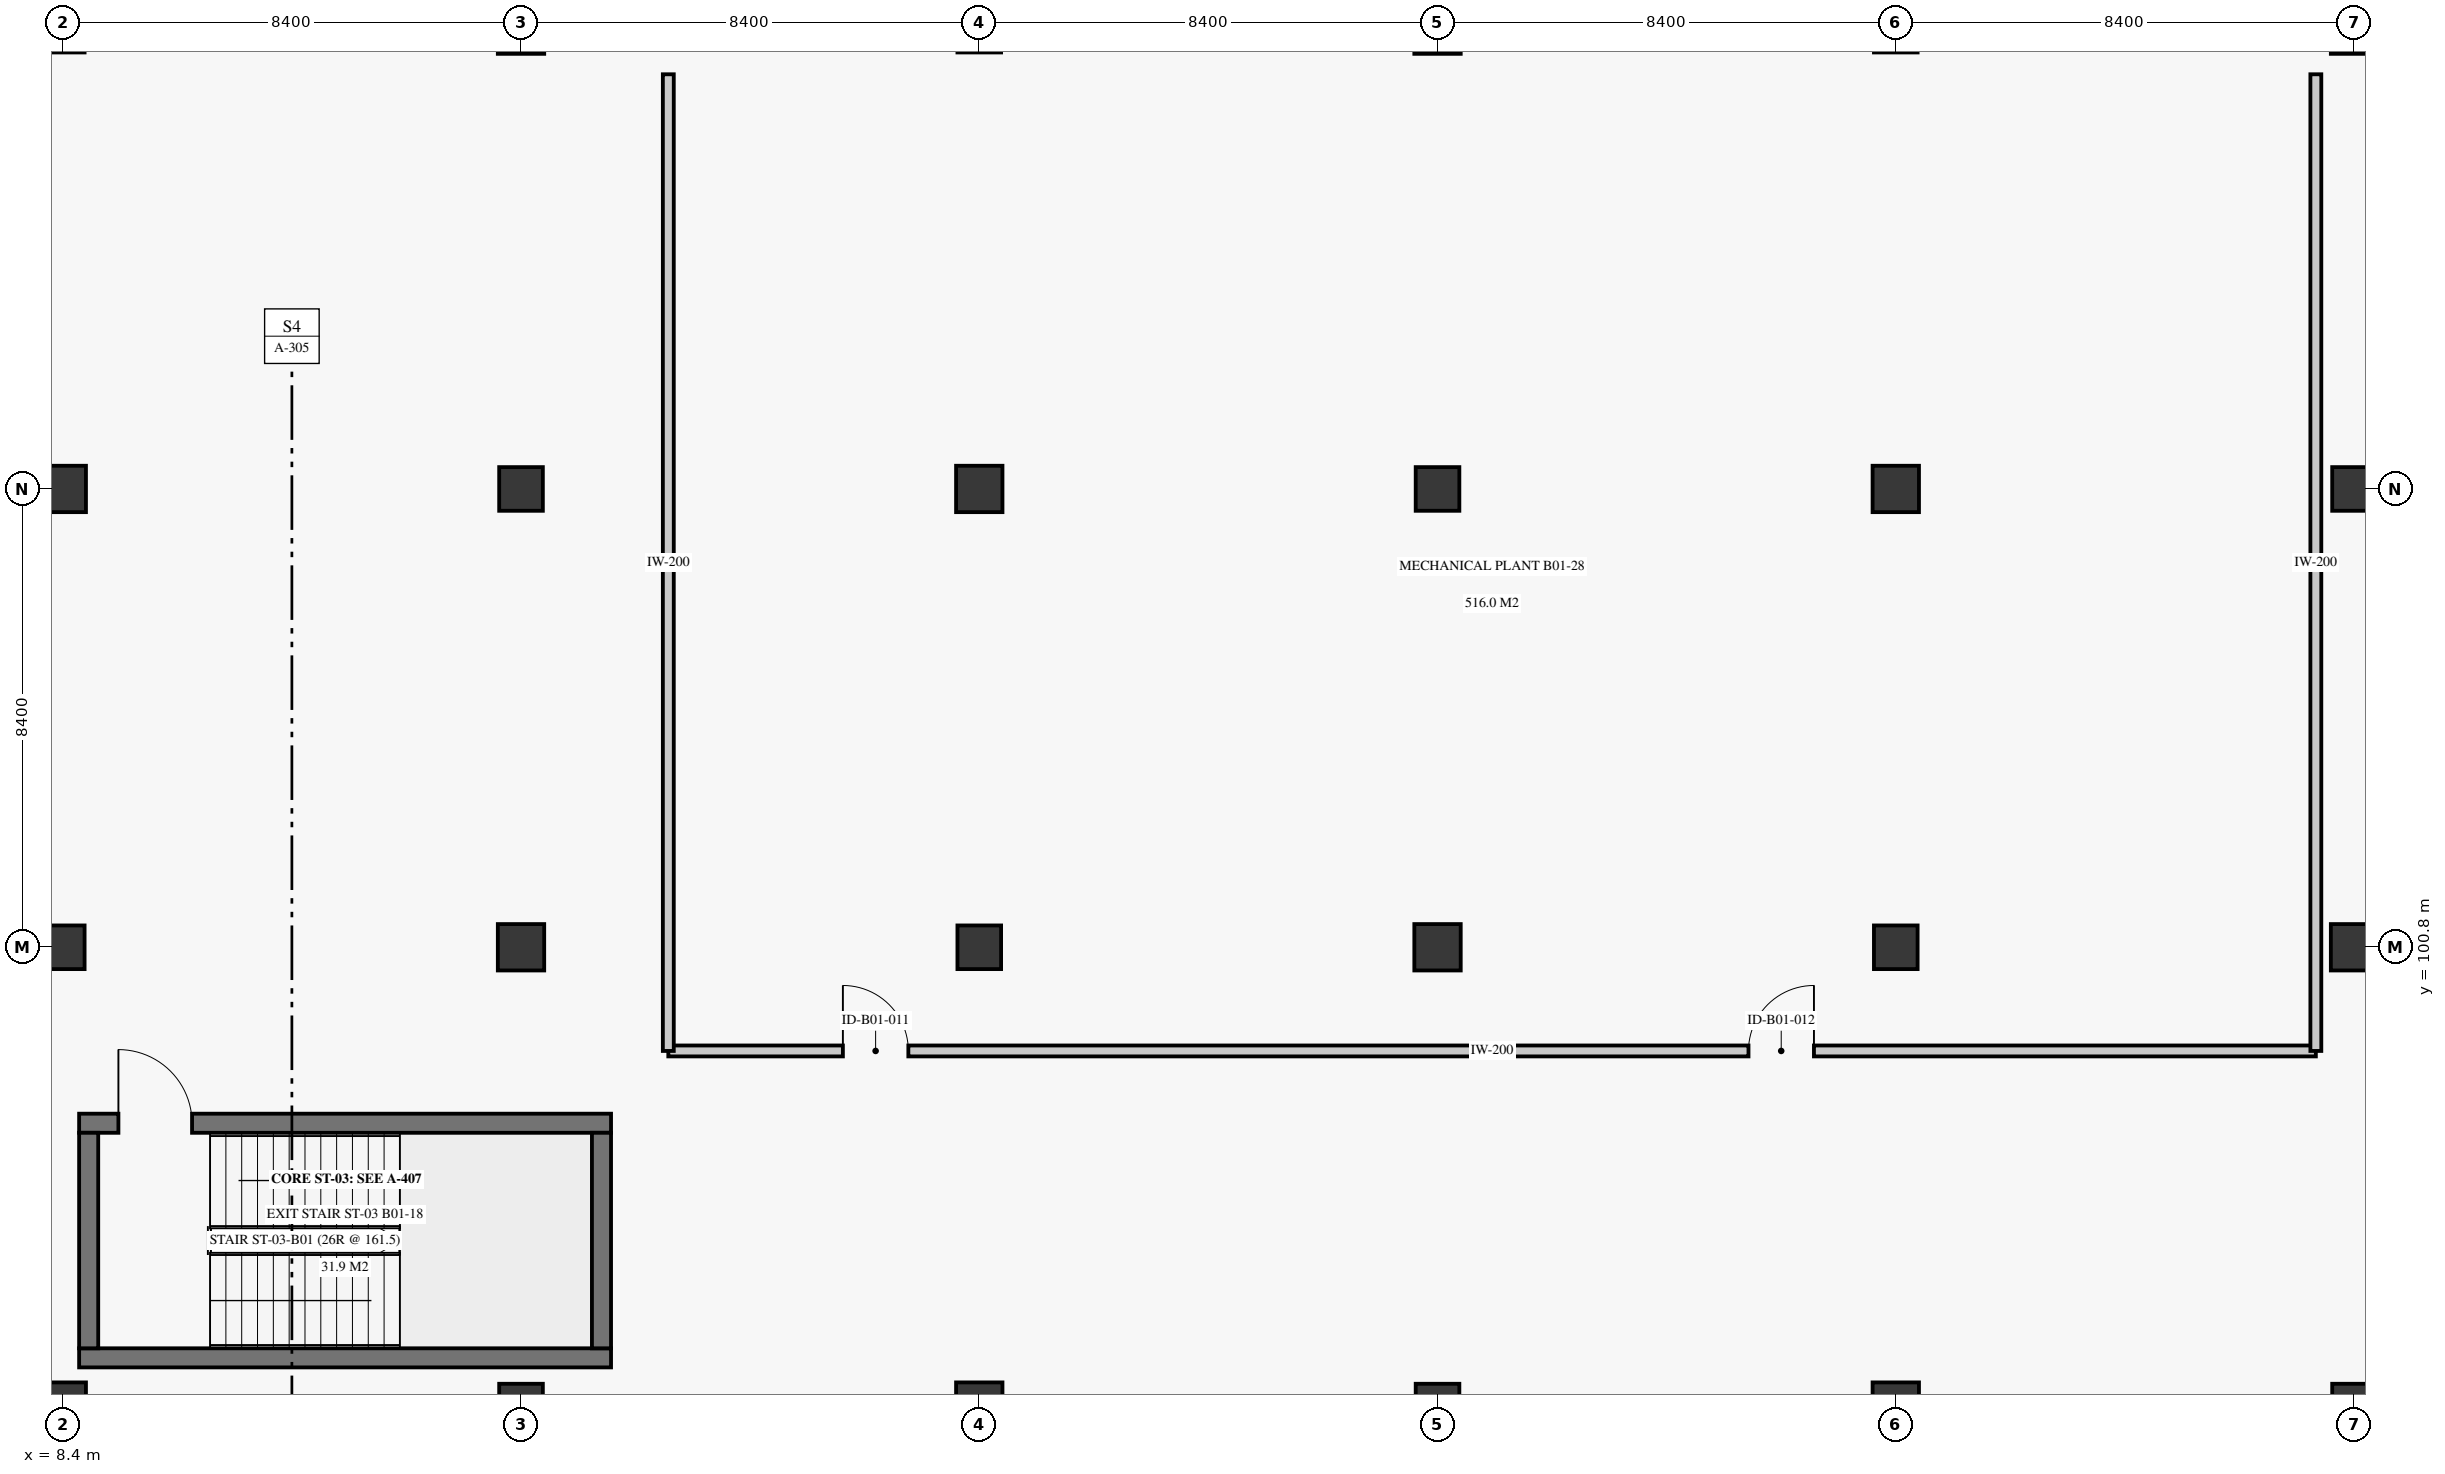
"""IFC4 building model, lengths in metres.
Left out: names, types, materials, properties, quantities, classifications, styles, units other than length and angle.
Written with IfcOpenShell. Run it as: python <this file> out.ifc"""

import sys

from ifc_helpers import new_model, si_unit, direction, frame, frame_2d, origin, origin_2d, place, context, subcontext, project, spatial, rectangle, extrude, element, fill, save


model = new_model("IFC4")
c1 = context("Model", 3, precision=1e-05, world=origin(), true_north=direction((0.0, 1.0)))
c2 = subcontext(c1, "Body", "Model", "MODEL_VIEW")
j1 = project(units=[si_unit("LENGTHUNIT", "METRE"), si_unit("PLANEANGLEUNIT", "RADIAN")], contexts=[c1])
p1 = place(None, origin())
s1 = spatial("IfcSite", under=j1, at=p1, CompositionType="ELEMENT")
p2 = place(p1, origin())
s2 = spatial("IfcBuilding", under=s1, at=p2, CompositionType="ELEMENT")
p3 = place(p2, frame((0.0, 0.0, -4.2)))
s3 = spatial("IfcBuildingStorey", under=s2, at=p3, CompositionType="ELEMENT", Elevation=-4.2)
p4 = place(p3, frame((8.4, 92.4, 0.0), z_axis=(0.0, 0.0, 1.0), x_axis=(1.0, 0.0, 0.0)))
e1 = element("IfcColumn", 1, at=p4, inside=s3, PredefinedType="COLUMN", context=c2, shape_type="SweptSolid", body=[
    extrude(rectangle(XDim=0.85, YDim=0.85, at=origin_2d()), origin(), (0.0, 0.0, 1.0), 3.88),
])
p5 = place(p3, frame((8.4, 100.8, 0.0), z_axis=(0.0, 0.0, 1.0), x_axis=(1.0, 0.0, 0.0)))
e2 = element("IfcColumn", 2, at=p5, inside=s3, PredefinedType="COLUMN", context=c2, shape_type="SweptSolid", body=[
    extrude(rectangle(XDim=0.8, YDim=0.8, at=origin_2d()), origin(), (0.0, 0.0, 1.0), 3.88),
])
p6 = place(p3, frame((8.4, 109.2, 0.0), z_axis=(0.0, 0.0, 1.0), x_axis=(1.0, 0.0, 0.0)))
e3 = element("IfcColumn", 3, at=p6, inside=s3, PredefinedType="COLUMN", context=c2, shape_type="SweptSolid", body=[
    extrude(rectangle(XDim=0.85, YDim=0.85, at=origin_2d()), origin(), (0.0, 0.0, 1.0), 3.88),
])
p7 = place(p3, frame((16.8, 92.4, 0.0), z_axis=(0.0, 0.0, 1.0), x_axis=(1.0, 0.0, 0.0)))
e4 = element("IfcColumn", 4, at=p7, inside=s3, PredefinedType="COLUMN", context=c2, shape_type="SweptSolid", body=[
    extrude(rectangle(XDim=0.8, YDim=0.8, at=origin_2d()), origin(), (0.0, 0.0, 1.0), 3.88),
])
p8 = place(p3, frame((16.8, 100.8, 0.0), z_axis=(0.0, 0.0, 1.0), x_axis=(1.0, 0.0, 0.0)))
e5 = element("IfcColumn", 5, at=p8, inside=s3, PredefinedType="COLUMN", context=c2, shape_type="SweptSolid", body=[
    extrude(rectangle(XDim=0.85, YDim=0.85, at=origin_2d()), origin(), (0.0, 0.0, 1.0), 3.88),
])
p9 = place(p3, frame((16.8, 109.2, 0.0), z_axis=(0.0, 0.0, 1.0), x_axis=(1.0, 0.0, 0.0)))
e6 = element("IfcColumn", 6, at=p9, inside=s3, PredefinedType="COLUMN", context=c2, shape_type="SweptSolid", body=[
    extrude(rectangle(XDim=0.8, YDim=0.8, at=origin_2d()), origin(), (0.0, 0.0, 1.0), 3.88),
])
for number, where, z_axis, x_axis in (
    (7, (16.8, 117.6, 0.0), (0.0, 0.0, 1.0), (1.0, 0.0, 0.0)),
    (8, (25.2, 92.4, 0.0), (0.0, 0.0, 1.0), (1.0, 0.0, 0.0)),
):
    element("IfcColumn", number, at=place(p3, frame(where, z_axis=z_axis, x_axis=x_axis)), inside=s3, PredefinedType="COLUMN", context=c2, shape_type="SweptSolid", body=[
        extrude(rectangle(XDim=0.85, YDim=0.85, at=origin_2d()), origin(), (0.0, 0.0, 1.0), 3.88),
    ])
p10 = place(p3, frame((25.2, 100.8, 0.0), z_axis=(0.0, 0.0, 1.0), x_axis=(1.0, 0.0, 0.0)))
e9 = element("IfcColumn", 9, at=p10, inside=s3, PredefinedType="COLUMN", context=c2, shape_type="SweptSolid", body=[
    extrude(rectangle(XDim=0.8, YDim=0.8, at=origin_2d()), origin(), (0.0, 0.0, 1.0), 3.88),
])
p11 = place(p3, frame((25.2, 109.2, 0.0), z_axis=(0.0, 0.0, 1.0), x_axis=(1.0, 0.0, 0.0)))
e10 = element("IfcColumn", 10, at=p11, inside=s3, PredefinedType="COLUMN", context=c2, shape_type="SweptSolid", body=[
    extrude(rectangle(XDim=0.85, YDim=0.85, at=origin_2d()), origin(), (0.0, 0.0, 1.0), 3.88),
])
p12 = place(p3, frame((33.6, 92.4, 0.0), z_axis=(0.0, 0.0, 1.0), x_axis=(1.0, 0.0, 0.0)))
e11 = element("IfcColumn", 11, at=p12, inside=s3, PredefinedType="COLUMN", context=c2, shape_type="SweptSolid", body=[
    extrude(rectangle(XDim=0.8, YDim=0.8, at=origin_2d()), origin(), (0.0, 0.0, 1.0), 3.88),
])
p13 = place(p3, frame((33.6, 100.8, 0.0), z_axis=(0.0, 0.0, 1.0), x_axis=(1.0, 0.0, 0.0)))
e12 = element("IfcColumn", 12, at=p13, inside=s3, PredefinedType="COLUMN", context=c2, shape_type="SweptSolid", body=[
    extrude(rectangle(XDim=0.85, YDim=0.85, at=origin_2d()), origin(), (0.0, 0.0, 1.0), 3.88),
])
p14 = place(p3, frame((33.6, 109.2, 0.0), z_axis=(0.0, 0.0, 1.0), x_axis=(1.0, 0.0, 0.0)))
e13 = element("IfcColumn", 13, at=p14, inside=s3, PredefinedType="COLUMN", context=c2, shape_type="SweptSolid", body=[
    extrude(rectangle(XDim=0.8, YDim=0.8, at=origin_2d()), origin(), (0.0, 0.0, 1.0), 3.88),
])
for number, where, z_axis, x_axis in (
    (14, (33.6, 117.6, 0.0), (0.0, 0.0, 1.0), (1.0, 0.0, 0.0)),
    (15, (42.0, 92.4, 0.0), (0.0, 0.0, 1.0), (1.0, 0.0, 0.0)),
):
    element("IfcColumn", number, at=place(p3, frame(where, z_axis=z_axis, x_axis=x_axis)), inside=s3, PredefinedType="COLUMN", context=c2, shape_type="SweptSolid", body=[
        extrude(rectangle(XDim=0.85, YDim=0.85, at=origin_2d()), origin(), (0.0, 0.0, 1.0), 3.88),
    ])
p15 = place(p3, frame((42.0, 100.8, 0.0), z_axis=(0.0, 0.0, 1.0), x_axis=(1.0, 0.0, 0.0)))
e16 = element("IfcColumn", 16, at=p15, inside=s3, PredefinedType="COLUMN", context=c2, shape_type="SweptSolid", body=[
    extrude(rectangle(XDim=0.8, YDim=0.8, at=origin_2d()), origin(), (0.0, 0.0, 1.0), 3.88),
])
p16 = place(p3, frame((42.0, 109.2, 0.0), z_axis=(0.0, 0.0, 1.0), x_axis=(1.0, 0.0, 0.0)))
e17 = element("IfcColumn", 17, at=p16, inside=s3, PredefinedType="COLUMN", context=c2, shape_type="SweptSolid", body=[
    extrude(rectangle(XDim=0.85, YDim=0.85, at=origin_2d()), origin(), (0.0, 0.0, 1.0), 3.88),
])
p17 = place(p3, frame((50.4, 92.4, 0.0), z_axis=(0.0, 0.0, 1.0), x_axis=(1.0, 0.0, 0.0)))
e18 = element("IfcColumn", 18, at=p17, inside=s3, PredefinedType="COLUMN", context=c2, shape_type="SweptSolid", body=[
    extrude(rectangle(XDim=0.8, YDim=0.8, at=origin_2d()), origin(), (0.0, 0.0, 1.0), 3.88),
])
p18 = place(p3, frame((50.4, 100.8, 0.0), z_axis=(0.0, 0.0, 1.0), x_axis=(1.0, 0.0, 0.0)))
e19 = element("IfcColumn", 19, at=p18, inside=s3, PredefinedType="COLUMN", context=c2, shape_type="SweptSolid", body=[
    extrude(rectangle(XDim=0.85, YDim=0.85, at=origin_2d()), origin(), (0.0, 0.0, 1.0), 3.88),
])
p19 = place(p3, frame((50.4, 109.2, 0.0), z_axis=(0.0, 0.0, 1.0), x_axis=(1.0, 0.0, 0.0)))
e20 = element("IfcColumn", 20, at=p19, inside=s3, PredefinedType="COLUMN", context=c2, shape_type="SweptSolid", body=[
    extrude(rectangle(XDim=0.8, YDim=0.8, at=origin_2d()), origin(), (0.0, 0.0, 1.0), 3.88),
])
p20 = place(p3, frame((50.4, 117.6, 0.0), z_axis=(0.0, 0.0, 1.0), x_axis=(1.0, 0.0, 0.0)))
e21 = element("IfcColumn", 21, at=p20, inside=s3, PredefinedType="COLUMN", context=c2, shape_type="SweptSolid", body=[
    extrude(rectangle(XDim=0.85, YDim=0.85, at=origin_2d()), origin(), (0.0, 0.0, 1.0), 3.88),
])
p21 = place(p3, frame((8.7, 93.275, 0.0), z_axis=(0.0, 0.0, 1.0), x_axis=(1.0, 0.0, 0.0)))
e22 = element("IfcWall", 22, at=p21, inside=s3, PredefinedType="SHEAR", context=c2, shape_type="SweptSolid", body=[
    extrude(rectangle(XDim=9.75, YDim=0.35, at=frame_2d((4.875, 0.0))), origin(), (0.0, 0.0, 1.0), 3.88),
])
p22 = place(p3, frame((8.7, 97.575, 0.0), z_axis=(0.0, 0.0, 1.0), x_axis=(1.0, 0.0, 0.0)))
e23 = element("IfcWall", 23, at=p22, inside=s3, PredefinedType="SHEAR", context=c2, shape_type="SweptSolid", body=[
    extrude(rectangle(XDim=9.75, YDim=0.35, at=frame_2d((4.875, 0.0))), origin(), (0.0, 0.0, 1.0), 3.88),
])
p23 = place(p22, frame((0.72, 0.0, 0.0)))
e24 = element("IfcOpeningElement", 24, at=p23, cuts=e23, PredefinedType="OPENING", context=c2, shape_type="SweptSolid", body=[
    extrude(rectangle(XDim=1.35, YDim=2.25, at=frame_2d((0.675, 1.125))), frame((0.0, 0.185, 0.0), z_axis=(0.0, -1.0, 0.0), x_axis=(1.0, 0.0, 0.0)), (0.0, 0.0, 1.0), 0.37),
])
for number, where, z_axis, x_axis in (
    (25, (8.875, 93.45, 0.0), (0.0, 0.0, 1.0), (0.0, 1.0, 0.0)),
    (26, (18.275, 93.45, 0.0), (0.0, 0.0, 1.0), (0.0, 1.0, 0.0)),
):
    element("IfcWall", number, at=place(p3, frame(where, z_axis=z_axis, x_axis=x_axis)), inside=s3, PredefinedType="SHEAR", context=c2, shape_type="SweptSolid", body=[
        extrude(rectangle(XDim=3.95, YDim=0.35, at=frame_2d((1.975, 0.0))), origin(), (0.0, 0.0, 1.0), 3.88),
    ])
p24 = place(p3, frame((19.5, 98.9, 0.0), z_axis=(0.0, 0.0, 1.0), x_axis=(1.0, 0.0, 0.0)))
e27 = element("IfcWall", 27, at=p24, inside=s3, PredefinedType="PARTITIONING", context=c2, shape_type="SweptSolid", body=[
    extrude(rectangle(XDim=30.2, YDim=0.2, at=frame_2d((15.1, 0.0))), origin(), (0.0, 0.0, 1.0), 3.5),
])
p25 = place(p24, frame((3.2, 0.0, 0.0)))
e28 = element("IfcOpeningElement", 28, at=p25, cuts=e27, PredefinedType="OPENING", context=c2, shape_type="SweptSolid", body=[
    extrude(rectangle(XDim=1.2, YDim=2.2, at=frame_2d((0.6, 1.1))), frame((0.0, 0.11, 0.0), z_axis=(0.0, -1.0, 0.0), x_axis=(1.0, 0.0, 0.0)), (0.0, 0.0, 1.0), 0.22),
])
p26 = place(p24, frame((19.8, 0.0, 0.0)))
e29 = element("IfcOpeningElement", 29, at=p26, cuts=e27, PredefinedType="OPENING", context=c2, shape_type="SweptSolid", body=[
    extrude(rectangle(XDim=1.2, YDim=2.2, at=frame_2d((0.6, 1.1))), frame((0.0, 0.11, 0.0), z_axis=(0.0, -1.0, 0.0), x_axis=(1.0, 0.0, 0.0)), (0.0, 0.0, 1.0), 0.22),
])
for number, where, z_axis, x_axis in (
    (30, (19.5, 98.9, 0.0), (0.0, 0.0, 1.0), (0.0, 1.0, 0.0)),
    (31, (49.7, 98.9, 0.0), (0.0, 0.0, 1.0), (0.0, 1.0, 0.0)),
):
    element("IfcWall", number, at=place(p3, frame(where, z_axis=z_axis, x_axis=x_axis)), inside=s3, PredefinedType="PARTITIONING", context=c2, shape_type="SweptSolid", body=[
        extrude(rectangle(XDim=17.9, YDim=0.2, at=frame_2d((8.95, 0.0))), origin(), (0.0, 0.0, 1.0), 3.5),
    ])
p27 = place(p23, origin())
e32 = element("IfcDoor", 32, at=p27, inside=s3, OperationType="SINGLE_SWING_LEFT", PredefinedType="DOOR", context=c2, shape_type="SweptSolid", body=[
    extrude(rectangle(XDim=1.35, YDim=2.25, at=frame_2d((0.675, 1.125))), frame((0.0, 0.025, 0.0), z_axis=(0.0, -1.0, 0.0), x_axis=(1.0, 0.0, 0.0)), (0.0, 0.0, 1.0), 0.05),
])
fill(e24, e32)
p28 = place(p25, origin())
e33 = element("IfcDoor", 33, at=p28, inside=s3, OperationType="SINGLE_SWING_LEFT", PredefinedType="DOOR", context=c2, shape_type="SweptSolid", body=[
    extrude(rectangle(XDim=1.2, YDim=2.2, at=frame_2d((0.6, 1.1))), frame((0.0, 0.025, 0.0), z_axis=(0.0, -1.0, 0.0), x_axis=(1.0, 0.0, 0.0)), (0.0, 0.0, 1.0), 0.05),
])
fill(e28, e33)
p29 = place(p26, origin())
e34 = element("IfcDoor", 34, at=p29, inside=s3, OperationType="SINGLE_SWING_RIGHT", PredefinedType="DOOR", context=c2, shape_type="SweptSolid", body=[
    extrude(rectangle(XDim=1.2, YDim=2.2, at=frame_2d((0.6, 1.1))), frame((0.0, 0.025, 0.0), z_axis=(0.0, -1.0, 0.0), x_axis=(1.0, 0.0, 0.0)), (0.0, 0.0, 1.0), 0.05),
])
fill(e29, e34)
save(model, sys.argv[1])
